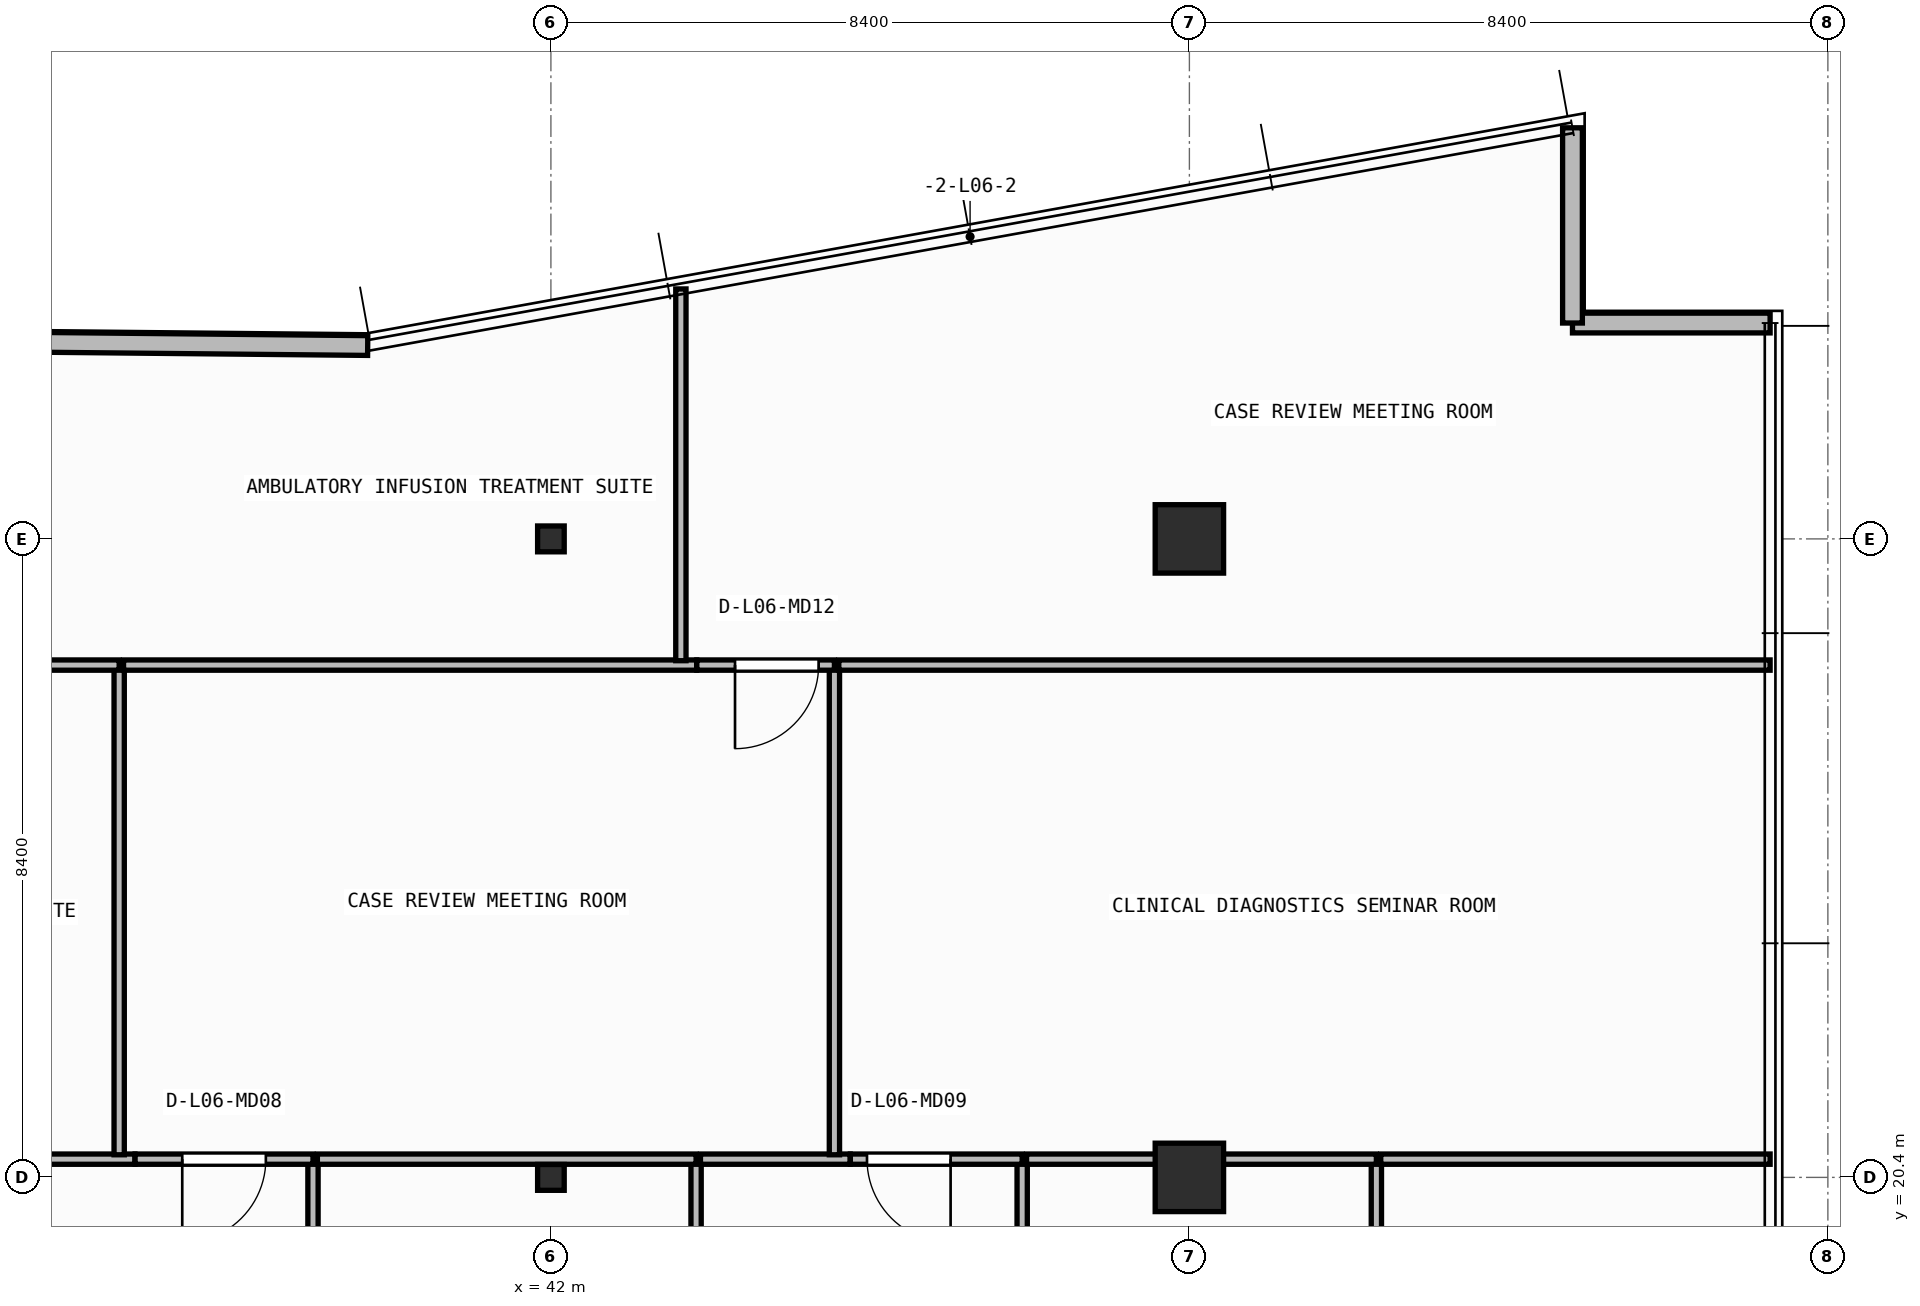
"""IFC4 building model, lengths in metres.
Left out: names, types, materials, properties, quantities, classifications, styles, units other than length and angle.
Written with IfcOpenShell. Run it as: python <this file> out.ifc"""

import sys

from ifc_helpers import new_model, si_unit, direction, frame, frame_2d, origin, origin_2d, place, context, subcontext, project, spatial, rectangle, i_section, extrude, element, fill, save


model = new_model("IFC4")
c1 = context("Model", 3, precision=1e-05, world=origin(), true_north=direction((0.0, 1.0)))
c2 = subcontext(c1, "Body", "Model", "MODEL_VIEW")
j1 = project(units=[si_unit("LENGTHUNIT", "METRE"), si_unit("PLANEANGLEUNIT", "RADIAN")], contexts=[c1])
p1 = place(None, origin())
s1 = spatial("IfcSite", under=j1, at=p1, CompositionType="ELEMENT")
p2 = place(p1, origin())
s2 = spatial("IfcBuilding", under=s1, at=p2, CompositionType="ELEMENT")
p3 = place(p2, frame((0.0, 0.0, 26.45)))
s3 = spatial("IfcBuildingStorey", under=s2, at=p3, CompositionType="ELEMENT", Elevation=26.45)
p4 = place(p3, frame((42.0, 20.4, 0.0), z_axis=(0.0, 0.0, 1.0), x_axis=(1.0, 0.0, 0.0)))
e1 = element("IfcColumn", 1, at=p4, inside=s3, PredefinedType="COLUMN", context=c2, shape_type="SweptSolid", body=[
    extrude(i_section(OverallWidth=0.35, OverallDepth=0.34, WebThickness=0.016, FlangeThickness=0.028, at=origin_2d()), origin(), (0.0, 0.0, 1.0), 3.95),
])
p5 = place(p3, frame((50.4, 20.4, 0.0), z_axis=(0.0, 0.0, 1.0), x_axis=(1.0, 0.0, 0.0)))
e2 = element("IfcColumn", 2, at=p5, inside=s3, PredefinedType="COLUMN", context=c2, shape_type="SweptSolid", body=[
    extrude(rectangle(XDim=0.9, YDim=0.9, at=origin_2d()), origin(), (0.0, 0.0, 1.0), 3.95),
])
p6 = place(p3, frame((42.0, 28.8, 0.0), z_axis=(0.0, 0.0, 1.0), x_axis=(1.0, 0.0, 0.0)))
e3 = element("IfcColumn", 3, at=p6, inside=s3, PredefinedType="COLUMN", context=c2, shape_type="SweptSolid", body=[
    extrude(i_section(OverallWidth=0.35, OverallDepth=0.34, WebThickness=0.016, FlangeThickness=0.028, at=origin_2d()), origin(), (0.0, 0.0, 1.0), 3.95),
])
p7 = place(p3, frame((50.4, 28.8, 0.0), z_axis=(0.0, 0.0, 1.0), x_axis=(1.0, 0.0, 0.0)))
e4 = element("IfcColumn", 4, at=p7, inside=s3, PredefinedType="COLUMN", context=c2, shape_type="SweptSolid", body=[
    extrude(rectangle(XDim=0.9, YDim=0.9, at=origin_2d()), origin(), (0.0, 0.0, 1.0), 3.95),
])
p8 = place(p3, frame((58.04, 31.64, 0.0), z_axis=(0.0, 0.0, 1.0), x_axis=(-1.0, 0.0, 0.0)))
e5 = element("IfcWall", 5, at=p8, inside=s3, PredefinedType="STANDARD", context=c2, shape_type="SweptSolid", body=[
    extrude(rectangle(XDim=2.6, YDim=0.26, at=frame_2d((1.3, 0.0))), origin(), (0.0, 0.0, 1.0), 3.71),
])
p9 = place(p3, frame((55.44, 31.64, 0.0), z_axis=(0.0, 0.0, 1.0), x_axis=(0.0, 1.0, 0.0)))
e6 = element("IfcWall", 6, at=p9, inside=s3, PredefinedType="STANDARD", context=c2, shape_type="SweptSolid", body=[
    extrude(rectangle(XDim=2.569, YDim=0.26, at=frame_2d((1.284, 0.0))), origin(), (0.0, 0.0, 1.0), 3.71),
])
p10 = place(p3, frame((39.59, 31.344, 0.0), z_axis=(0.0, 0.0, 1.0), x_axis=(-0.999952362926, 0.009760731435, 0.0)))
e7 = element("IfcWall", 7, at=p10, inside=s3, PredefinedType="STANDARD", context=c2, shape_type="SweptSolid", body=[
    extrude(rectangle(XDim=15.183, YDim=0.26, at=frame_2d((7.591, 0.0))), origin(), (0.0, 0.0, 1.0), 3.71),
])
p11 = place(p10, frame((6.391, 0.0, 0.9)))
e8 = element("IfcOpeningElement", 8, at=p11, cuts=e7, PredefinedType="OPENING", context=c2, shape_type="SweptSolid", body=[
    extrude(rectangle(XDim=2.4, YDim=1.65, at=frame_2d((1.2, 0.825))), frame((0.0, 0.14, 0.0), z_axis=(0.0, -1.0, 0.0), x_axis=(1.0, 0.0, 0.0)), (0.0, 0.0, 1.0), 0.28),
])
p12 = place(p3, frame((38.87, 14.76, 0.0), z_axis=(0.0, 0.0, 1.0), x_axis=(0.0, 1.0, 0.0)))
e9 = element("IfcWall", 9, at=p12, inside=s3, PredefinedType="PARTITIONING", context=c2, shape_type="SweptSolid", body=[
    extrude(rectangle(XDim=5.88, YDim=0.135, at=frame_2d((2.94, 0.0))), origin(), (0.0, 0.0, 1.0), 3.71),
])
p13 = place(p3, frame((36.528, 20.64, 0.0), z_axis=(0.0, 0.0, 1.0), x_axis=(-1.0, 0.0, 0.0)))
e10 = element("IfcWall", 10, at=p13, inside=s3, PredefinedType="PARTITIONING", context=c2, shape_type="SweptSolid", body=[
    extrude(rectangle(XDim=2.26, YDim=0.135, at=frame_2d((1.13, 0.0))), origin(), (0.0, 0.0, 1.0), 3.073),
])
p14 = place(p3, frame((38.87, 20.64, 0.0), z_axis=(0.0, 0.0, 1.0), x_axis=(-1.0, 0.0, 0.0)))
e11 = element("IfcWall", 11, at=p14, inside=s3, PredefinedType="PARTITIONING", context=c2, shape_type="SweptSolid", body=[
    extrude(rectangle(XDim=2.341, YDim=0.135, at=frame_2d((1.17, 0.0))), origin(), (0.0, 0.0, 1.0), 3.073),
])
p15 = place(p14, frame((0.62, 0.0, 0.0)))
e12 = element("IfcOpeningElement", 12, at=p15, cuts=e11, PredefinedType="OPENING", context=c2, shape_type="SweptSolid", body=[
    extrude(rectangle(XDim=1.1, YDim=2.1, at=frame_2d((0.55, 1.05))), frame((0.0, 0.077, 0.0), z_axis=(0.0, -1.0, 0.0), x_axis=(1.0, 0.0, 0.0)), (0.0, 0.0, 1.0), 0.155),
])
p16 = place(p3, frame((43.91, 17.833, 0.0), z_axis=(0.0, 0.0, 1.0), x_axis=(0.0, 1.0, 0.0)))
e13 = element("IfcWall", 13, at=p16, inside=s3, PredefinedType="PARTITIONING", context=c2, shape_type="SweptSolid", body=[
    extrude(rectangle(XDim=2.807, YDim=0.135, at=frame_2d((1.404, 0.0))), origin(), (0.0, 0.0, 1.0), 3.71),
])
p17 = place(p3, frame((43.91, 20.64, 0.0), z_axis=(0.0, 0.0, 1.0), x_axis=(-1.0, 0.0, 0.0)))
e14 = element("IfcWall", 14, at=p17, inside=s3, PredefinedType="PARTITIONING", context=c2, shape_type="SweptSolid", body=[
    extrude(rectangle(XDim=4.982, YDim=0.135, at=frame_2d((2.491, 0.0))), origin(), (0.0, 0.0, 1.0), 3.073),
])
p18 = place(p3, frame((48.2, 14.76, 0.0), z_axis=(0.0, 0.0, 1.0), x_axis=(0.0, 1.0, 0.0)))
e15 = element("IfcWall", 15, at=p18, inside=s3, PredefinedType="PARTITIONING", context=c2, shape_type="SweptSolid", body=[
    extrude(rectangle(XDim=5.88, YDim=0.135, at=frame_2d((2.94, 0.0))), origin(), (0.0, 0.0, 1.0), 3.71),
])
p19 = place(p3, frame((45.938, 20.64, 0.0), z_axis=(0.0, 0.0, 1.0), x_axis=(-1.0, 0.0, 0.0)))
e16 = element("IfcWall", 16, at=p19, inside=s3, PredefinedType="PARTITIONING", context=c2, shape_type="SweptSolid", body=[
    extrude(rectangle(XDim=1.97, YDim=0.135, at=frame_2d((0.985, 0.0))), origin(), (0.0, 0.0, 1.0), 3.073),
])
p20 = place(p3, frame((48.2, 20.64, 0.0), z_axis=(0.0, 0.0, 1.0), x_axis=(-1.0, 0.0, 0.0)))
e17 = element("IfcWall", 17, at=p20, inside=s3, PredefinedType="PARTITIONING", context=c2, shape_type="SweptSolid", body=[
    extrude(rectangle(XDim=2.26, YDim=0.135, at=frame_2d((1.13, 0.0))), origin(), (0.0, 0.0, 1.0), 3.073),
])
p21 = place(p20, frame((0.941, 0.0, 0.0)))
e18 = element("IfcOpeningElement", 18, at=p21, cuts=e17, PredefinedType="OPENING", context=c2, shape_type="SweptSolid", body=[
    extrude(rectangle(XDim=1.1, YDim=2.1, at=frame_2d((0.55, 1.05))), frame((0.0, 0.077, 0.0), z_axis=(0.0, -1.0, 0.0), x_axis=(1.0, 0.0, 0.0)), (0.0, 0.0, 1.0), 0.155),
])
p22 = place(p3, frame((52.86, 17.833, 0.0), z_axis=(0.0, 0.0, 1.0), x_axis=(0.0, 1.0, 0.0)))
e19 = element("IfcWall", 19, at=p22, inside=s3, PredefinedType="PARTITIONING", context=c2, shape_type="SweptSolid", body=[
    extrude(rectangle(XDim=2.807, YDim=0.135, at=frame_2d((1.404, 0.0))), origin(), (0.0, 0.0, 1.0), 3.71),
])
p23 = place(p3, frame((52.86, 20.64, 0.0), z_axis=(0.0, 0.0, 1.0), x_axis=(-1.0, 0.0, 0.0)))
e20 = element("IfcWall", 20, at=p23, inside=s3, PredefinedType="PARTITIONING", context=c2, shape_type="SweptSolid", body=[
    extrude(rectangle(XDim=4.603, YDim=0.135, at=frame_2d((2.301, 0.0))), origin(), (0.0, 0.0, 1.0), 3.073),
])
p24 = place(p3, frame((58.04, 20.64, 0.0), z_axis=(0.0, 0.0, 1.0), x_axis=(-1.0, 0.0, 0.0)))
e21 = element("IfcWall", 21, at=p24, inside=s3, PredefinedType="PARTITIONING", context=c2, shape_type="SweptSolid", body=[
    extrude(rectangle(XDim=5.123, YDim=0.135, at=frame_2d((2.561, 0.0))), origin(), (0.0, 0.0, 1.0), 3.71),
])
p25 = place(p3, frame((36.32, 20.698, 0.0), z_axis=(0.0, 0.0, 1.0), x_axis=(0.0, 1.0, 0.0)))
e22 = element("IfcWall", 22, at=p25, inside=s3, PredefinedType="PARTITIONING", context=c2, shape_type="SweptSolid", body=[
    extrude(rectangle(XDim=6.442, YDim=0.135, at=frame_2d((3.221, 0.0))), origin(), (0.0, 0.0, 1.0), 3.71),
])
p26 = place(p3, frame((36.32, 27.14, 0.0), z_axis=(0.0, 0.0, 1.0), x_axis=(-1.0, 0.0, 0.0)))
e23 = element("IfcWall", 23, at=p26, inside=s3, PredefinedType="PARTITIONING", context=c2, shape_type="SweptSolid", body=[
    extrude(rectangle(XDim=17.571, YDim=0.135, at=frame_2d((8.785, 0.0))), origin(), (0.0, 0.0, 1.0), 3.71),
])
p27 = place(p26, frame((14.663, 0.0, 0.0)))
e24 = element("IfcOpeningElement", 24, at=p27, cuts=e23, PredefinedType="OPENING", context=c2, shape_type="SweptSolid", body=[
    extrude(rectangle(XDim=1.1, YDim=2.1, at=frame_2d((0.55, 1.05))), frame((0.0, 0.077, 0.0), z_axis=(0.0, -1.0, 0.0), x_axis=(1.0, 0.0, 0.0)), (0.0, 0.0, 1.0), 0.155),
])
p28 = place(p3, frame((45.73, 20.698, 0.0), z_axis=(0.0, 0.0, 1.0), x_axis=(0.0, 1.0, 0.0)))
e25 = element("IfcWall", 25, at=p28, inside=s3, PredefinedType="PARTITIONING", context=c2, shape_type="SweptSolid", body=[
    extrude(rectangle(XDim=6.442, YDim=0.135, at=frame_2d((3.221, 0.0))), origin(), (0.0, 0.0, 1.0), 3.71),
])
p29 = place(p3, frame((43.917, 27.14, 0.0), z_axis=(0.0, 0.0, 1.0), x_axis=(-1.0, 0.0, 0.0)))
e26 = element("IfcWall", 26, at=p29, inside=s3, PredefinedType="PARTITIONING", context=c2, shape_type="SweptSolid", body=[
    extrude(rectangle(XDim=7.54, YDim=0.135, at=frame_2d((3.77, 0.0))), origin(), (0.0, 0.0, 1.0), 3.71),
])
p30 = place(p3, frame((45.73, 27.14, 0.0), z_axis=(0.0, 0.0, 1.0), x_axis=(-1.0, 0.0, 0.0)))
e27 = element("IfcWall", 27, at=p30, inside=s3, PredefinedType="PARTITIONING", context=c2, shape_type="SweptSolid", body=[
    extrude(rectangle(XDim=1.811, YDim=0.135, at=frame_2d((0.905, 0.0))), origin(), (0.0, 0.0, 1.0), 3.71),
])
p31 = place(p30, frame((0.208, 0.0, 0.0)))
e28 = element("IfcOpeningElement", 28, at=p31, cuts=e27, PredefinedType="OPENING", context=c2, shape_type="SweptSolid", body=[
    extrude(rectangle(XDim=1.1, YDim=2.1, at=frame_2d((0.55, 1.05))), frame((0.0, 0.077, 0.0), z_axis=(0.0, -1.0, 0.0), x_axis=(1.0, 0.0, 0.0)), (0.0, 0.0, 1.0), 0.155),
])
p32 = place(p3, frame((58.04, 27.14, 0.0), z_axis=(0.0, 0.0, 1.0), x_axis=(-1.0, 0.0, 0.0)))
e29 = element("IfcWall", 29, at=p32, inside=s3, PredefinedType="PARTITIONING", context=c2, shape_type="SweptSolid", body=[
    extrude(rectangle(XDim=12.252, YDim=0.135, at=frame_2d((6.126, 0.0))), origin(), (0.0, 0.0, 1.0), 3.71),
])
p33 = place(p3, frame((43.71, 27.198, 0.0), z_axis=(0.0, 0.0, 1.0), x_axis=(0.0, 1.0, 0.0)))
e30 = element("IfcWall", 30, at=p33, inside=s3, PredefinedType="PARTITIONING", context=c2, shape_type="SweptSolid", body=[
    extrude(rectangle(XDim=4.891, YDim=0.135, at=frame_2d((2.445, 0.0))), origin(), (0.0, 0.0, 1.0), 3.71),
])
p34 = place(p15, origin())
e31 = element("IfcDoor", 31, at=p34, inside=s3, OperationType="SINGLE_SWING_RIGHT", PredefinedType="DOOR", context=c2, shape_type="SweptSolid", body=[
    extrude(rectangle(XDim=1.1, YDim=2.1, at=frame_2d((0.55, 1.05))), frame((0.0, 0.025, 0.0), z_axis=(0.0, -1.0, 0.0), x_axis=(1.0, 0.0, 0.0)), (0.0, 0.0, 1.0), 0.05),
])
fill(e12, e31)
p35 = place(p21, origin())
e32 = element("IfcDoor", 32, at=p35, inside=s3, OperationType="SINGLE_SWING_LEFT", PredefinedType="DOOR", context=c2, shape_type="SweptSolid", body=[
    extrude(rectangle(XDim=1.1, YDim=2.1, at=frame_2d((0.55, 1.05))), frame((0.0, 0.025, 0.0), z_axis=(0.0, -1.0, 0.0), x_axis=(1.0, 0.0, 0.0)), (0.0, 0.0, 1.0), 0.05),
])
fill(e18, e32)
p36 = place(p31, origin())
e33 = element("IfcDoor", 33, at=p36, inside=s3, OperationType="SINGLE_SWING_RIGHT", PredefinedType="DOOR", context=c2, shape_type="SweptSolid", body=[
    extrude(rectangle(XDim=1.1, YDim=2.1, at=frame_2d((0.55, 1.05))), frame((0.0, 0.025, 0.0), z_axis=(0.0, -1.0, 0.0), x_axis=(1.0, 0.0, 0.0)), (0.0, 0.0, 1.0), 0.05),
])
fill(e28, e33)
save(model, sys.argv[1])
